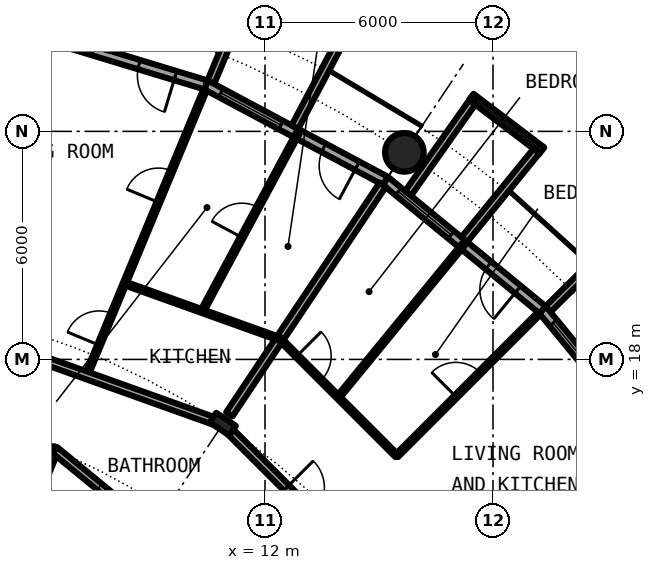
"""IFC4 building model, lengths in metres.
Left out: names, types, materials, properties, quantities, classifications, styles, units other than length and angle.
Written with IfcOpenShell. Run it as: python <this file> out.ifc"""

import sys

from ifc_helpers import new_model, si_unit, direction, frame, frame_2d, origin, origin_2d, place, context, subcontext, project, spatial, rectangle, circle, hollow_circle, i_section, extrude, element, fill, save


model = new_model("IFC4")
c1 = context("Model", 3, precision=1e-05, world=origin(), true_north=direction((0.0, 1.0)))
c2 = subcontext(c1, "Body", "Model", "MODEL_VIEW")
j1 = project(units=[si_unit("LENGTHUNIT", "METRE"), si_unit("PLANEANGLEUNIT", "RADIAN")], contexts=[c1])
p1 = place(None, origin())
s1 = spatial("IfcSite", under=j1, at=p1, CompositionType="ELEMENT")
p2 = place(p1, origin())
s2 = spatial("IfcBuilding", under=s1, at=p2, CompositionType="ELEMENT")
p3 = place(p2, frame((0.0, 0.0, 35.0)))
s3 = spatial("IfcBuildingStorey", under=s2, at=p3, CompositionType="ELEMENT", Elevation=35.0)
p4 = place(p3, frame((15.667, 23.448, 0.0), z_axis=(0.0, 0.0, 1.0), x_axis=(1.0, 0.0, 0.0)))
e1 = element("IfcColumn", 1, at=p4, inside=s3, PredefinedType="COLUMN", context=c2, shape_type="SweptSolid", body=[
    extrude(hollow_circle(Radius=0.508, WallThickness=0.05, at=origin_2d()), origin(), (0.0, 0.0, 1.0), 3.05),
])
p5 = place(p3, frame((10.889, 16.297, 0.0), z_axis=(0.0, 0.0, 1.0), x_axis=(0.55557023302, 0.831469612303, 0.0)))
e2 = element("IfcColumn", 2, at=p5, inside=s3, PredefinedType="COLUMN", context=c2, shape_type="SweptSolid", body=[
    extrude(i_section(OverallWidth=0.305, OverallDepth=0.62, WebThickness=0.021, FlangeThickness=0.04, FilletRadius=0.027, at=origin_2d()), origin(), (0.0, 0.0, 1.0), 3.05),
])
p6 = place(p3, frame((22.699, 15.167, 0.0), z_axis=(0.0, 0.0, 1.0), x_axis=(-0.634382322723, 0.773019449054, 0.0)))
e3 = element("IfcWall", 3, at=p6, inside=s3, PredefinedType="SOLIDWALL", context=c2, shape_type="SweptSolid", body=[
    extrude(rectangle(XDim=5.352, YDim=0.25, at=frame_2d((2.676, 0.0))), origin(), (0.0, 0.0, 1.0), 2.7),
])
p7 = place(p6, frame((0.841, 0.0, 0.0)))
e4 = element("IfcOpeningElement", 4, at=p7, cuts=e3, PredefinedType="OPENING", context=c2, shape_type="SweptSolid", body=[
    extrude(rectangle(XDim=1.0, YDim=2.2, at=frame_2d((0.5, 1.1))), frame((0.0, 0.135, 0.0), z_axis=(0.0, -1.0, 0.0), x_axis=(1.0, 0.0, 0.0)), (0.0, 0.0, 1.0), 0.27),
])
p8 = place(p6, frame((3.111, 0.0, 0.3)))
e5 = element("IfcOpeningElement", 5, at=p8, cuts=e3, PredefinedType="OPENING", context=c2, shape_type="SweptSolid", body=[
    extrude(rectangle(XDim=1.8, YDim=2.1, at=frame_2d((0.9, 1.05))), frame((0.0, 0.135, 0.0), z_axis=(0.0, -1.0, 0.0), x_axis=(1.0, 0.0, 0.0)), (0.0, 0.0, 1.0), 0.27),
])
p9 = place(p3, frame((19.45, 19.323, -0.03), z_axis=(0.0, 0.0, 1.0), x_axis=(0.709727076896, 0.704476739375, 0.0)))
e6 = element("IfcWall", 6, at=p9, inside=s3, PredefinedType="SOLIDWALL", context=c2, shape_type="SweptSolid", body=[
    extrude(rectangle(XDim=2.883, YDim=0.2, at=frame_2d((1.441, 0.0))), origin(), (0.0, 0.0, 1.0), 2.73),
])
p10 = place(p3, frame((19.304, 19.304, 0.0), z_axis=(0.0, 0.0, 1.0), x_axis=(-0.773019449054, 0.634382322723, 0.0)))
e7 = element("IfcWall", 7, at=p10, inside=s3, PredefinedType="SOLIDWALL", context=c2, shape_type="SweptSolid", body=[
    extrude(rectangle(XDim=5.352, YDim=0.25, at=frame_2d((2.676, 0.0))), origin(), (0.0, 0.0, 1.0), 2.7),
])
p11 = place(p10, frame((0.841, 0.0, 0.0)))
e8 = element("IfcOpeningElement", 8, at=p11, cuts=e7, PredefinedType="OPENING", context=c2, shape_type="SweptSolid", body=[
    extrude(rectangle(XDim=1.0, YDim=2.2, at=frame_2d((0.5, 1.1))), frame((0.0, 0.135, 0.0), z_axis=(0.0, -1.0, 0.0), x_axis=(1.0, 0.0, 0.0)), (0.0, 0.0, 1.0), 0.27),
])
p12 = place(p10, frame((3.111, 0.0, 0.3)))
e9 = element("IfcOpeningElement", 9, at=p12, cuts=e7, PredefinedType="OPENING", context=c2, shape_type="SweptSolid", body=[
    extrude(rectangle(XDim=1.8, YDim=2.1, at=frame_2d((0.9, 1.05))), frame((0.0, 0.135, 0.0), z_axis=(0.0, -1.0, 0.0), x_axis=(1.0, 0.0, 0.0)), (0.0, 0.0, 1.0), 0.27),
])
p13 = place(p3, frame((19.289, 23.497, -0.03), z_axis=(0.0, 0.0, 1.0), x_axis=(-0.796842165306, 0.60418752353, 0.0)))
e10 = element("IfcWall", 10, at=p13, inside=s3, PredefinedType="SOLIDWALL", context=c2, shape_type="SweptSolid", body=[
    extrude(rectangle(XDim=2.337, YDim=0.2, at=frame_2d((1.168, 0.0))), origin(), (0.0, 0.0, 1.0), 2.73),
])
p14 = place(p13, frame((0.128, 0.0, 0.33)))
e11 = element("IfcOpeningElement", 11, at=p14, cuts=e10, PredefinedType="OPENING", context=c2, shape_type="SweptSolid", body=[
    extrude(circle(Radius=1.04, at=frame_2d((1.04, 1.04))), frame((0.0, 0.11, 0.0), z_axis=(0.0, -1.0, 0.0), x_axis=(1.0, 0.0, 0.0)), (0.0, 0.0, 1.0), 0.22),
])
p15 = place(p3, frame((17.246, 21.155, -0.03), z_axis=(0.0, 0.0, 1.0), x_axis=(0.631741648902, 0.775179004516, 0.0)))
e12 = element("IfcWall", 12, at=p15, inside=s3, PredefinedType="SOLIDWALL", context=c2, shape_type="SweptSolid", body=[
    extrude(rectangle(XDim=3.006, YDim=0.2, at=frame_2d((1.503, 0.0))), origin(), (0.0, 0.0, 1.0), 2.73),
])
p16 = place(p3, frame((15.765, 22.37, -0.03), z_axis=(0.0, 0.0, 1.0), x_axis=(0.576274612209, 0.817256123454, 0.0)))
e13 = element("IfcWall", 13, at=p16, inside=s3, PredefinedType="SOLIDWALL", context=c2, shape_type="SweptSolid", body=[
    extrude(rectangle(XDim=2.933, YDim=0.2, at=frame_2d((1.466, 0.0))), origin(), (0.0, 0.0, 1.0), 2.73),
])
p17 = place(p3, frame((15.167, 22.699, 0.0), z_axis=(0.0, 0.0, 1.0), x_axis=(-0.881915646801, 0.471407246368, 0.0)))
e14 = element("IfcWall", 14, at=p17, inside=s3, PredefinedType="SOLIDWALL", context=c2, shape_type="SweptSolid", body=[
    extrude(rectangle(XDim=5.352, YDim=0.25, at=frame_2d((2.676, 0.0))), origin(), (0.0, 0.0, 1.0), 2.7),
])
p18 = place(p17, frame((0.841, 0.0, 0.0)))
e15 = element("IfcOpeningElement", 15, at=p18, cuts=e14, PredefinedType="OPENING", context=c2, shape_type="SweptSolid", body=[
    extrude(rectangle(XDim=1.0, YDim=2.2, at=frame_2d((0.5, 1.1))), frame((0.0, 0.135, 0.0), z_axis=(0.0, -1.0, 0.0), x_axis=(1.0, 0.0, 0.0)), (0.0, 0.0, 1.0), 0.27),
])
p19 = place(p17, frame((3.111, 0.0, 0.3)))
e16 = element("IfcOpeningElement", 16, at=p19, cuts=e14, PredefinedType="OPENING", context=c2, shape_type="SweptSolid", body=[
    extrude(rectangle(XDim=1.8, YDim=2.1, at=frame_2d((0.9, 1.05))), frame((0.0, 0.135, 0.0), z_axis=(0.0, -1.0, 0.0), x_axis=(1.0, 0.0, 0.0)), (0.0, 0.0, 1.0), 0.27),
])
p20 = place(p3, frame((12.787, 24.113, -0.03), z_axis=(0.0, 0.0, 1.0), x_axis=(0.468365282436, 0.883534924159, 0.0)))
e17 = element("IfcWall", 17, at=p20, inside=s3, PredefinedType="SOLIDWALL", context=c2, shape_type="SweptSolid", body=[
    extrude(rectangle(XDim=3.006, YDim=0.2, at=frame_2d((1.503, 0.0))), origin(), (0.0, 0.0, 1.0), 2.73),
])
p21 = place(p3, frame((10.575, 25.295, -0.03), z_axis=(0.0, 0.0, 1.0), x_axis=(0.385697364644, 0.922625353492, 0.0)))
e18 = element("IfcWall", 18, at=p21, inside=s3, PredefinedType="SOLIDWALL", context=c2, shape_type="SweptSolid", body=[
    extrude(rectangle(XDim=2.883, YDim=0.2, at=frame_2d((1.442, 0.0))), origin(), (0.0, 0.0, 1.0), 2.73),
])
p22 = place(p3, frame((10.447, 25.222, 0.0), z_axis=(0.0, 0.0, 1.0), x_axis=(-0.956965678721, 0.290201119486, 0.0)))
e19 = element("IfcWall", 19, at=p22, inside=s3, PredefinedType="SOLIDWALL", context=c2, shape_type="SweptSolid", body=[
    extrude(rectangle(XDim=5.351, YDim=0.25, at=frame_2d((2.676, 0.0))), origin(), (0.0, 0.0, 1.0), 2.7),
])
p23 = place(p22, frame((0.841, 0.0, 0.0)))
e20 = element("IfcOpeningElement", 20, at=p23, cuts=e19, PredefinedType="OPENING", context=c2, shape_type="SweptSolid", body=[
    extrude(rectangle(XDim=1.0, YDim=2.2, at=frame_2d((0.5, 1.1))), frame((0.0, 0.135, 0.0), z_axis=(0.0, -1.0, 0.0), x_axis=(1.0, 0.0, 0.0)), (0.0, 0.0, 1.0), 0.27),
])
p24 = place(p22, frame((3.111, 0.0, 0.3)))
e21 = element("IfcOpeningElement", 21, at=p24, cuts=e19, PredefinedType="OPENING", context=c2, shape_type="SweptSolid", body=[
    extrude(rectangle(XDim=1.8, YDim=2.1, at=frame_2d((0.9, 1.05))), frame((0.0, 0.135, 0.0), z_axis=(0.0, -1.0, 0.0), x_axis=(1.0, 0.0, 0.0)), (0.0, 0.0, 1.0), 0.27),
])
p25 = place(p3, frame((2.955, 7.132, 0.0), z_axis=(0.0, 0.0, 1.0), x_axis=(0.382556139466, 0.923932248683, 0.0)))
e22 = element("IfcWall", 22, at=p25, inside=s3, PredefinedType="PARTITIONING", context=c2, shape_type="SweptSolid", body=[
    extrude(rectangle(XDim=9.18, YDim=0.2, at=frame_2d((4.59, 0.0))), origin(), (0.0, 0.0, 1.0), 2.7),
])
p26 = place(p3, frame((7.302, 17.58, 0.0), z_axis=(0.0, 0.0, 1.0), x_axis=(0.383616168183, 0.923492628833, 0.0)))
e23 = element("IfcWall", 23, at=p26, inside=s3, PredefinedType="PARTITIONING", context=c2, shape_type="SweptSolid", body=[
    extrude(rectangle(XDim=8.138, YDim=0.1, at=frame_2d((4.069, 0.0))), origin(), (0.0, 0.0, 1.0), 2.7),
])
p27 = place(p26, frame((0.861, 0.0, 0.0)))
e24 = element("IfcOpeningElement", 24, at=p27, cuts=e23, PredefinedType="OPENING", context=c2, shape_type="SweptSolid", body=[
    extrude(rectangle(XDim=0.9, YDim=2.3, at=frame_2d((0.45, 1.15))), frame((0.0, 0.06, 0.0), z_axis=(0.0, -1.0, 0.0), x_axis=(1.0, 0.0, 0.0)), (0.0, 0.0, 1.0), 0.12),
])
p28 = place(p26, frame((4.931, 0.0, 0.0)))
e25 = element("IfcOpeningElement", 25, at=p28, cuts=e23, PredefinedType="OPENING", context=c2, shape_type="SweptSolid", body=[
    extrude(rectangle(XDim=0.9, YDim=2.3, at=frame_2d((0.45, 1.15))), frame((0.0, 0.06, 0.0), z_axis=(0.0, -1.0, 0.0), x_axis=(1.0, 0.0, 0.0)), (0.0, 0.0, 1.0), 0.12),
])
p29 = place(p3, frame((10.349, 19.272, 0.0), z_axis=(0.0, 0.0, 1.0), x_axis=(0.472967735543, 0.881079747319, 0.0)))
e26 = element("IfcWall", 26, at=p29, inside=s3, PredefinedType="PARTITIONING", context=c2, shape_type="SweptSolid", body=[
    extrude(rectangle(XDim=5.3, YDim=0.1, at=frame_2d((2.65, 0.0))), origin(), (0.0, 0.0, 1.0), 2.7),
])
p30 = place(p29, frame((2.2, 0.0, 0.0)))
e27 = element("IfcOpeningElement", 27, at=p30, cuts=e26, PredefinedType="OPENING", context=c2, shape_type="SweptSolid", body=[
    extrude(rectangle(XDim=0.9, YDim=2.3, at=frame_2d((0.45, 1.15))), frame((0.0, 0.06, 0.0), z_axis=(0.0, -1.0, 0.0), x_axis=(1.0, 0.0, 0.0)), (0.0, 0.0, 1.0), 0.12),
])
p31 = place(p3, frame((11.061, 16.555, 0.0), z_axis=(0.0, 0.0, 1.0), x_axis=(0.555576285599, 0.831465568067, 0.0)))
e28 = element("IfcWall", 28, at=p31, inside=s3, PredefinedType="PARTITIONING", context=c2, shape_type="SweptSolid", body=[
    extrude(rectangle(XDim=7.264, YDim=0.2, at=frame_2d((3.632, 0.0))), origin(), (0.0, 0.0, 1.0), 2.7),
])
p32 = place(p3, frame((13.927, 17.004, 0.0), z_axis=(0.0, 0.0, 1.0), x_axis=(0.633774976367, 0.773517471898, 0.0)))
e29 = element("IfcWall", 29, at=p32, inside=s3, PredefinedType="PARTITIONING", context=c2, shape_type="SweptSolid", body=[
    extrude(rectangle(XDim=5.196, YDim=0.1, at=frame_2d((2.598, 0.0))), origin(), (0.0, 0.0, 1.0), 2.7),
])
p33 = place(p3, frame((15.465, 15.465, 0.0), z_axis=(0.0, 0.0, 1.0), x_axis=(0.707106781187, 0.707106781187, 0.0)))
e30 = element("IfcWall", 30, at=p33, inside=s3, PredefinedType="PARTITIONING", context=c2, shape_type="SweptSolid", body=[
    extrude(rectangle(XDim=5.305, YDim=0.1, at=frame_2d((2.652, 0.0))), origin(), (0.0, 0.0, 1.0), 2.7),
])
p34 = place(p33, frame((2.202, 0.0, 0.0)))
e31 = element("IfcOpeningElement", 31, at=p34, cuts=e30, PredefinedType="OPENING", context=c2, shape_type="SweptSolid", body=[
    extrude(rectangle(XDim=0.9, YDim=2.3, at=frame_2d((0.45, 1.15))), frame((0.0, 0.06, 0.0), z_axis=(0.0, -1.0, 0.0), x_axis=(1.0, 0.0, 0.0)), (0.0, 0.0, 1.0), 0.12),
])
p35 = place(p3, frame((18.542, 12.389, 0.0), z_axis=(0.0, 0.0, 1.0), x_axis=(0.831387096605, 0.55569370664, 0.0)))
e32 = element("IfcWall", 32, at=p35, inside=s3, PredefinedType="PARTITIONING", context=c2, shape_type="SweptSolid", body=[
    extrude(rectangle(XDim=4.875, YDim=0.2, at=frame_2d((2.438, 0.0))), origin(), (0.0, 0.0, 1.0), 2.7),
])
p36 = place(p3, frame((-6.467, 15.614, 0.0), z_axis=(0.0, 0.0, 1.0), x_axis=(1.0, 0.0, 0.0)))
e33 = element("IfcWall", 33, at=p36, inside=s3, PredefinedType="PARTITIONING", context=c2, shape_type="SweptSolid", body=[
    extrude(rectangle(XDim=12.934, YDim=0.2, at=frame_2d((6.467, 0.0))), origin(), (0.0, 0.0, 1.0), 2.7),
])
p37 = place(p36, frame((4.35, 0.0, 0.0)))
e34 = element("IfcOpeningElement", 34, at=p37, cuts=e33, PredefinedType="OPENING", context=c2, shape_type="SweptSolid", body=[
    extrude(rectangle(XDim=1.0, YDim=2.3, at=frame_2d((0.5, 1.15))), frame((0.0, 0.11, 0.0), z_axis=(0.0, -1.0, 0.0), x_axis=(1.0, 0.0, 0.0)), (0.0, 0.0, 1.0), 0.22),
])
p38 = place(p3, frame((6.469, 15.613, 0.0), z_axis=(0.0, 0.0, 1.0), x_axis=(0.77298340166, -0.634426245326, 0.0)))
e35 = element("IfcWall", 35, at=p38, inside=s3, PredefinedType="PARTITIONING", context=c2, shape_type="SweptSolid", body=[
    extrude(rectangle(XDim=9.793, YDim=0.2, at=frame_2d((4.896, 0.0))), origin(), (0.0, 0.0, 1.0), 2.7),
])
p39 = place(p38, frame((4.404, 0.0, 0.0)))
e36 = element("IfcOpeningElement", 36, at=p39, cuts=e35, PredefinedType="OPENING", context=c2, shape_type="SweptSolid", body=[
    extrude(rectangle(XDim=1.0, YDim=2.3, at=frame_2d((0.5, 1.15))), frame((0.0, 0.11, 0.0), z_axis=(0.0, -1.0, 0.0), x_axis=(1.0, 0.0, 0.0)), (0.0, 0.0, 1.0), 0.22),
])
p40 = place(p3, frame((1.918, 19.506, 0.0), z_axis=(0.0, 0.0, 1.0), x_axis=(0.941574977747, -0.336803446065, 0.0)))
e37 = element("IfcWall", 37, at=p40, inside=s3, PredefinedType="PARTITIONING", context=c2, shape_type="SweptSolid", body=[
    extrude(rectangle(XDim=9.37, YDim=0.2, at=frame_2d((4.685, 0.0))), origin(), (0.0, 0.0, 1.0), 2.38),
])
p41 = place(p40, frame((3.313, 0.0, 0.0)))
e38 = element("IfcOpeningElement", 38, at=p41, cuts=e37, PredefinedType="OPENING", context=c2, shape_type="SweptSolid", body=[
    extrude(rectangle(XDim=1.0, YDim=2.3, at=frame_2d((0.5, 1.15))), frame((0.0, 0.11, 0.0), z_axis=(0.0, -1.0, 0.0), x_axis=(1.0, 0.0, 0.0)), (0.0, 0.0, 1.0), 0.22),
])
p42 = place(p3, frame((10.999, 16.187, 0.0), z_axis=(0.0, 0.0, 1.0), x_axis=(0.707106781187, -0.707106781187, 0.0)))
e39 = element("IfcWall", 39, at=p42, inside=s3, PredefinedType="PARTITIONING", context=c2, shape_type="SweptSolid", body=[
    extrude(rectangle(XDim=7.337, YDim=0.2, at=frame_2d((3.668, 0.0))), origin(), (0.0, 0.0, 1.0), 2.38),
])
p43 = place(p42, frame((2.212, 0.0, 0.0)))
e40 = element("IfcOpeningElement", 40, at=p43, cuts=e39, PredefinedType="OPENING", context=c2, shape_type="SweptSolid", body=[
    extrude(rectangle(XDim=1.0, YDim=2.3, at=frame_2d((0.5, 1.15))), frame((0.0, 0.11, 0.0), z_axis=(0.0, -1.0, 0.0), x_axis=(1.0, 0.0, 0.0)), (0.0, 0.0, 1.0), 0.22),
])
p44 = place(p3, frame((8.318, 19.996, 0.0), z_axis=(0.0, 0.0, 1.0), x_axis=(0.941370462946, -0.337374645598, 0.0)))
e41 = element("IfcWall", 41, at=p44, inside=s3, PredefinedType="PARTITIONING", context=c2, shape_type="SweptSolid", body=[
    extrude(rectangle(XDim=4.334, YDim=0.1, at=frame_2d((2.167, 0.0))), origin(), (0.0, 0.0, 1.0), 2.7),
])
p45 = place(p3, frame((12.389, 18.542, 0.0), z_axis=(0.0, 0.0, 1.0), x_axis=(0.707022606819, -0.707190945535, 0.0)))
e42 = element("IfcWall", 42, at=p45, inside=s3, PredefinedType="PARTITIONING", context=c2, shape_type="SweptSolid", body=[
    extrude(rectangle(XDim=4.351, YDim=0.1, at=frame_2d((2.175, 0.0))), origin(), (0.0, 0.0, 1.0), 2.7),
])
p46 = place(p45, frame((0.639, 0.0, 0.0)))
e43 = element("IfcOpeningElement", 43, at=p46, cuts=e42, PredefinedType="OPENING", context=c2, shape_type="SweptSolid", body=[
    extrude(rectangle(XDim=0.9, YDim=2.3, at=frame_2d((0.45, 1.15))), frame((0.0, 0.06, 0.0), z_axis=(0.0, -1.0, 0.0), x_axis=(1.0, 0.0, 0.0)), (0.0, 0.0, 1.0), 0.12),
])
p47 = place(p8, origin())
e44 = element("IfcWindow", 44, at=p47, inside=s3, PartitioningType="SINGLE_PANEL", PredefinedType="WINDOW", context=c2, shape_type="SweptSolid", body=[
    extrude(rectangle(XDim=1.8, YDim=2.1, at=frame_2d((0.9, 1.05))), frame((0.0, 0.03, 0.0), z_axis=(0.0, -1.0, 0.0), x_axis=(1.0, 0.0, 0.0)), (0.0, 0.0, 1.0), 0.06),
])
fill(e5, e44)
p48 = place(p11, origin())
e45 = element("IfcDoor", 45, at=p48, inside=s3, OperationType="SINGLE_SWING_LEFT", PredefinedType="DOOR", context=c2, shape_type="SweptSolid", body=[
    extrude(rectangle(XDim=1.0, YDim=2.2, at=frame_2d((0.5, 1.1))), frame((0.0, 0.025, 0.0), z_axis=(0.0, -1.0, 0.0), x_axis=(1.0, 0.0, 0.0)), (0.0, 0.0, 1.0), 0.05),
])
fill(e8, e45)
p49 = place(p12, origin())
e46 = element("IfcWindow", 46, at=p49, inside=s3, PartitioningType="SINGLE_PANEL", PredefinedType="WINDOW", context=c2, shape_type="SweptSolid", body=[
    extrude(rectangle(XDim=1.8, YDim=2.1, at=frame_2d((0.9, 1.05))), frame((0.0, 0.03, 0.0), z_axis=(0.0, -1.0, 0.0), x_axis=(1.0, 0.0, 0.0)), (0.0, 0.0, 1.0), 0.06),
])
fill(e9, e46)
p50 = place(p14, origin())
e47 = element("IfcWindow", 47, at=p50, inside=s3, PartitioningType="SINGLE_PANEL", PredefinedType="WINDOW", context=c2, shape_type="SweptSolid", body=[
    extrude(circle(Radius=1.04, at=frame_2d((1.04, 1.04))), frame((0.0, 0.03, 0.0), z_axis=(0.0, -1.0, 0.0), x_axis=(1.0, 0.0, 0.0)), (0.0, 0.0, 1.0), 0.06),
])
fill(e11, e47)
p51 = place(p18, origin())
e48 = element("IfcDoor", 48, at=p51, inside=s3, OperationType="SINGLE_SWING_LEFT", PredefinedType="DOOR", context=c2, shape_type="SweptSolid", body=[
    extrude(rectangle(XDim=1.0, YDim=2.2, at=frame_2d((0.5, 1.1))), frame((0.0, 0.025, 0.0), z_axis=(0.0, -1.0, 0.0), x_axis=(1.0, 0.0, 0.0)), (0.0, 0.0, 1.0), 0.05),
])
fill(e15, e48)
p52 = place(p19, origin())
e49 = element("IfcWindow", 49, at=p52, inside=s3, PartitioningType="SINGLE_PANEL", PredefinedType="WINDOW", context=c2, shape_type="SweptSolid", body=[
    extrude(rectangle(XDim=1.8, YDim=2.1, at=frame_2d((0.9, 1.05))), frame((0.0, 0.03, 0.0), z_axis=(0.0, -1.0, 0.0), x_axis=(1.0, 0.0, 0.0)), (0.0, 0.0, 1.0), 0.06),
])
fill(e16, e49)
p53 = place(p23, origin())
e50 = element("IfcDoor", 50, at=p53, inside=s3, OperationType="SINGLE_SWING_LEFT", PredefinedType="DOOR", context=c2, shape_type="SweptSolid", body=[
    extrude(rectangle(XDim=1.0, YDim=2.2, at=frame_2d((0.5, 1.1))), frame((0.0, 0.025, 0.0), z_axis=(0.0, -1.0, 0.0), x_axis=(1.0, 0.0, 0.0)), (0.0, 0.0, 1.0), 0.05),
])
fill(e20, e50)
p54 = place(p43, origin())
e51 = element("IfcDoor", 51, at=p54, inside=s3, OperationType="SINGLE_SWING_LEFT", PredefinedType="DOOR", context=c2, shape_type="SweptSolid", body=[
    extrude(rectangle(XDim=1.0, YDim=2.3, at=frame_2d((0.5, 1.15))), frame((0.0, 0.025, 0.0), z_axis=(0.0, -1.0, 0.0), x_axis=(1.0, 0.0, 0.0)), (0.0, 0.0, 1.0), 0.05),
])
fill(e40, e51)
p55 = place(p34, origin())
e52 = element("IfcDoor", 52, at=p55, inside=s3, OperationType="SINGLE_SWING_RIGHT", PredefinedType="DOOR", context=c2, shape_type="SweptSolid", body=[
    extrude(rectangle(XDim=0.9, YDim=2.3, at=frame_2d((0.45, 1.15))), frame((0.0, 0.025, 0.0), z_axis=(0.0, -1.0, 0.0), x_axis=(1.0, 0.0, 0.0)), (0.0, 0.0, 1.0), 0.05),
])
fill(e31, e52)
p56 = place(p46, origin())
e53 = element("IfcDoor", 53, at=p56, inside=s3, OperationType="SINGLE_SWING_LEFT", PredefinedType="DOOR", context=c2, shape_type="SweptSolid", body=[
    extrude(rectangle(XDim=0.9, YDim=2.3, at=frame_2d((0.45, 1.15))), frame((0.0, 0.025, 0.0), z_axis=(0.0, -1.0, 0.0), x_axis=(1.0, 0.0, 0.0)), (0.0, 0.0, 1.0), 0.05),
])
fill(e43, e53)
p57 = place(p27, origin())
e54 = element("IfcDoor", 54, at=p57, inside=s3, OperationType="SINGLE_SWING_LEFT", PredefinedType="DOOR", context=c2, shape_type="SweptSolid", body=[
    extrude(rectangle(XDim=0.9, YDim=2.3, at=frame_2d((0.45, 1.15))), frame((0.0, 0.025, 0.0), z_axis=(0.0, -1.0, 0.0), x_axis=(1.0, 0.0, 0.0)), (0.0, 0.0, 1.0), 0.05),
])
fill(e24, e54)
p58 = place(p28, origin())
e55 = element("IfcDoor", 55, at=p58, inside=s3, OperationType="SINGLE_SWING_RIGHT", PredefinedType="DOOR", context=c2, shape_type="SweptSolid", body=[
    extrude(rectangle(XDim=0.9, YDim=2.3, at=frame_2d((0.45, 1.15))), frame((0.0, 0.025, 0.0), z_axis=(0.0, -1.0, 0.0), x_axis=(1.0, 0.0, 0.0)), (0.0, 0.0, 1.0), 0.05),
])
fill(e25, e55)
p59 = place(p30, origin())
e56 = element("IfcDoor", 56, at=p59, inside=s3, OperationType="SINGLE_SWING_RIGHT", PredefinedType="DOOR", context=c2, shape_type="SweptSolid", body=[
    extrude(rectangle(XDim=0.9, YDim=2.3, at=frame_2d((0.45, 1.15))), frame((0.0, 0.025, 0.0), z_axis=(0.0, -1.0, 0.0), x_axis=(1.0, 0.0, 0.0)), (0.0, 0.0, 1.0), 0.05),
])
fill(e27, e56)
save(model, sys.argv[1])
